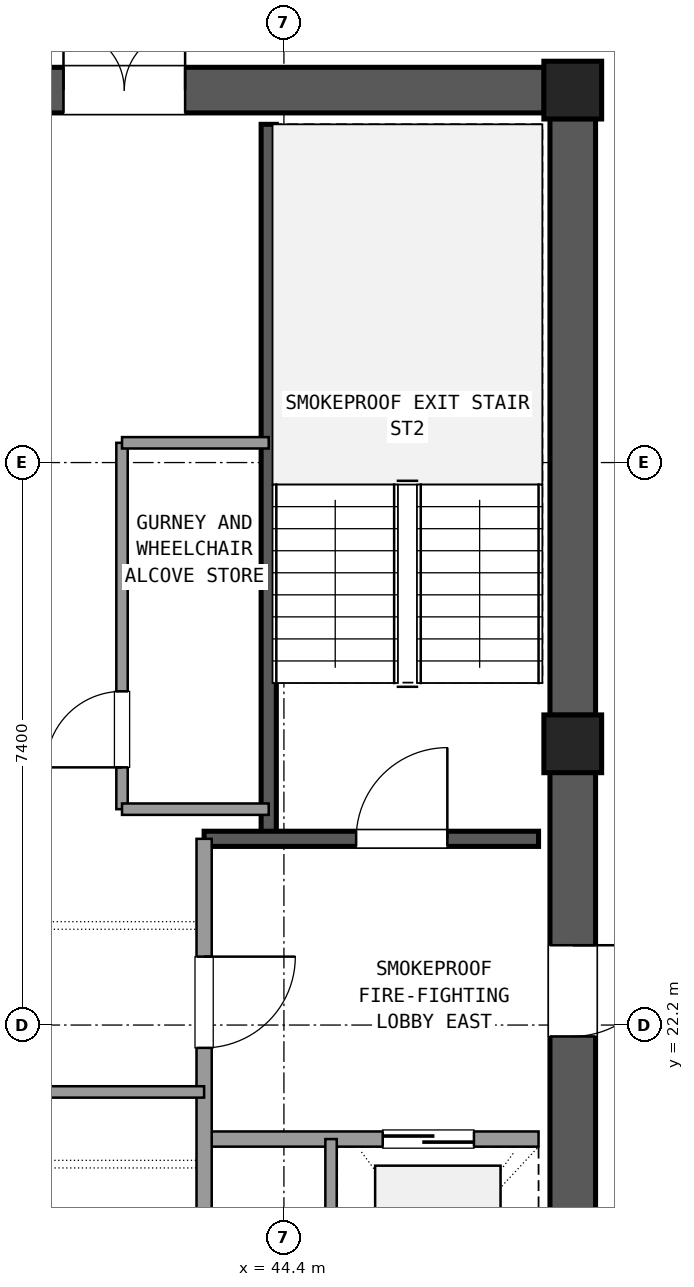
"""IFC4 building model, lengths in metres.
Left out: names, types, materials, properties, quantities, classifications, styles, units other than length and angle.
Written with IfcOpenShell. Run it as: python <this file> out.ifc"""

import sys

from ifc_helpers import new_model, si_unit, direction, frame, frame_2d, origin, origin_2d, place, context, subcontext, project, spatial, rectangle, extrude, element, fill, save


model = new_model("IFC4")
c1 = context("Model", 3, precision=1e-05, world=origin(), true_north=direction((0.0, 1.0)))
c2 = subcontext(c1, "Body", "Model", "MODEL_VIEW")
j1 = project(units=[si_unit("LENGTHUNIT", "METRE"), si_unit("PLANEANGLEUNIT", "RADIAN")], contexts=[c1])
p1 = place(None, origin())
s1 = spatial("IfcSite", under=j1, at=p1, CompositionType="ELEMENT")
p2 = place(p1, origin())
s2 = spatial("IfcBuilding", under=s1, at=p2, CompositionType="ELEMENT")
p3 = place(p2, frame((0.0, 0.0, 271.62)))
s3 = spatial("IfcBuildingStorey", under=s2, at=p3, CompositionType="ELEMENT", Elevation=271.62)
for number, where, z_axis, x_axis in (
    (1, (48.2, 25.9, 0.0), (0.0, 0.0, 1.0), (1.0, 0.0, 0.0)),
    (2, (48.2, 34.5, 0.0), (0.0, 0.0, 1.0), (1.0, 0.0, 0.0)),
):
    element("IfcColumn", number, at=place(p3, frame(where, z_axis=z_axis, x_axis=x_axis)), inside=s3, PredefinedType="COLUMN", context=c2, shape_type="SweptSolid", body=[
        extrude(rectangle(XDim=0.76, YDim=0.76, at=origin_2d()), origin(), (0.0, 0.0, 1.0), 3.6),
    ])
p4 = place(p3, frame((48.2, 17.675, 0.0), z_axis=(0.0, 0.0, 1.0), x_axis=(0.0, 1.0, 0.0)))
e3 = element("IfcWall", 3, at=p4, inside=s3, PredefinedType="SHEAR", context=c2, shape_type="SweptSolid", body=[
    extrude(rectangle(XDim=7.85, YDim=0.6, at=frame_2d((3.925, 0.0))), origin(), (0.0, 0.0, 1.0), 3.32),
])
p5 = place(p4, frame((4.375, 0.0, 0.0)))
e4 = element("IfcOpeningElement", 4, at=p5, cuts=e3, PredefinedType="OPENING", context=c2, shape_type="SweptSolid", body=[
    extrude(rectangle(XDim=1.2, YDim=2.15, at=frame_2d((0.6, 1.075))), frame((0.0, 0.31, 0.0), z_axis=(0.0, -1.0, 0.0), x_axis=(1.0, 0.0, 0.0)), (0.0, 0.0, 1.0), 0.62),
])
p6 = place(p3, frame((48.2, 26.275, 0.0), z_axis=(0.0, 0.0, 1.0), x_axis=(0.0, 1.0, 0.0)))
e5 = element("IfcWall", 5, at=p6, inside=s3, PredefinedType="SHEAR", context=c2, shape_type="SweptSolid", body=[
    extrude(rectangle(XDim=7.85, YDim=0.6, at=frame_2d((3.925, 0.0))), origin(), (0.0, 0.0, 1.0), 3.32),
])
p7 = place(p3, frame((47.825, 34.5, 0.0), z_axis=(0.0, 0.0, 1.0), x_axis=(-1.0, 0.0, 0.0)))
e6 = element("IfcWall", 6, at=p7, inside=s3, PredefinedType="SHEAR", context=c2, shape_type="SweptSolid", body=[
    extrude(rectangle(XDim=10.45, YDim=0.6, at=frame_2d((5.225, 0.0))), origin(), (0.0, 0.0, 1.0), 3.32),
])
p8 = place(p7, frame((4.725, 0.0, 0.0)))
e7 = element("IfcOpeningElement", 7, at=p8, cuts=e6, PredefinedType="OPENING", context=c2, shape_type="SweptSolid", body=[
    extrude(rectangle(XDim=1.6, YDim=2.2, at=frame_2d((0.8, 1.1))), frame((0.0, 0.31, 0.0), z_axis=(0.0, -1.0, 0.0), x_axis=(1.0, 0.0, 0.0)), (0.0, 0.0, 1.0), 0.62),
])
p9 = place(p3, frame((44.2, 24.65, 0.0), z_axis=(0.0, 0.0, 1.0), x_axis=(0.0, 1.0, 0.0)))
e8 = element("IfcWall", 8, at=p9, inside=s3, PredefinedType="SHEAR", context=c2, shape_type="SweptSolid", body=[
    extrude(rectangle(XDim=9.4, YDim=0.2, at=frame_2d((4.7, 0.0))), origin(), (0.0, 0.0, 1.0), 3.32),
])
p10 = place(p3, frame((43.35, 24.65, 0.0), z_axis=(0.0, 0.0, 1.0), x_axis=(1.0, 0.0, 0.0)))
e9 = element("IfcWall", 9, at=p10, inside=s3, PredefinedType="SHEAR", context=c2, shape_type="SweptSolid", body=[
    extrude(rectangle(XDim=4.4, YDim=0.2, at=frame_2d((2.2, 0.0))), origin(), (0.0, 0.0, 1.0), 3.32),
])
p11 = place(p10, frame((2.0, 0.0, 0.0)))
e10 = element("IfcOpeningElement", 10, at=p11, cuts=e9, PredefinedType="OPENING", context=c2, shape_type="SweptSolid", body=[
    extrude(rectangle(XDim=1.2, YDim=2.15, at=frame_2d((0.6, 1.075))), frame((0.0, 0.11, 0.0), z_axis=(0.0, -1.0, 0.0), x_axis=(1.0, 0.0, 0.0)), (0.0, 0.0, 1.0), 0.22),
])
p12 = place(p3, frame((43.35, 20.7, 0.0), z_axis=(0.0, 0.0, 1.0), x_axis=(1.0, 0.0, 0.0)))
e11 = element("IfcWall", 11, at=p12, inside=s3, PredefinedType="SOLIDWALL", context=c2, shape_type="SweptSolid", body=[
    extrude(rectangle(XDim=4.4, YDim=0.2, at=frame_2d((2.2, 0.0))), origin(), (0.0, 0.0, 1.0), 2.61),
])
p13 = place(p12, frame((2.35, 0.0, 0.0)))
e12 = element("IfcOpeningElement", 12, at=p13, cuts=e11, PredefinedType="OPENING", context=c2, shape_type="SweptSolid", body=[
    extrude(rectangle(XDim=1.2, YDim=2.15, at=frame_2d((0.6, 1.075))), frame((0.0, 0.11, 0.0), z_axis=(0.0, -1.0, 0.0), x_axis=(1.0, 0.0, 0.0)), (0.0, 0.0, 1.0), 0.22),
])
p14 = place(p3, frame((43.35, 17.75, 0.0), z_axis=(0.0, 0.0, 1.0), x_axis=(0.0, 1.0, 0.0)))
e13 = element("IfcWall", 13, at=p14, inside=s3, PredefinedType="SOLIDWALL", context=c2, shape_type="SweptSolid", body=[
    extrude(rectangle(XDim=6.9, YDim=0.2, at=frame_2d((3.45, 0.0))), origin(), (0.0, 0.0, 1.0), 2.61),
])
p15 = place(p14, frame((4.15, 0.0, 0.0)))
e14 = element("IfcOpeningElement", 14, at=p15, cuts=e13, PredefinedType="OPENING", context=c2, shape_type="SweptSolid", body=[
    extrude(rectangle(XDim=1.2, YDim=2.15, at=frame_2d((0.6, 1.075))), frame((0.0, 0.11, 0.0), z_axis=(0.0, -1.0, 0.0), x_axis=(1.0, 0.0, 0.0)), (0.0, 0.0, 1.0), 0.22),
])
p16 = place(p3, frame((45.02, 17.75, 0.0), z_axis=(0.0, 0.0, 1.0), x_axis=(0.0, 1.0, 0.0)))
e15 = element("IfcWall", 15, at=p16, inside=s3, PredefinedType="PARTITIONING", context=c2, shape_type="SweptSolid", body=[
    extrude(rectangle(XDim=2.95, YDim=0.15, at=frame_2d((1.475, 0.0))), origin(), (0.0, 0.0, 1.0), 2.61),
])
p17 = place(p3, frame((37.25, 21.32, 0.0), z_axis=(0.0, 0.0, 1.0), x_axis=(1.0, 0.0, 0.0)))
e16 = element("IfcWall", 16, at=p17, inside=s3, PredefinedType="PARTITIONING", context=c2, shape_type="SweptSolid", body=[
    extrude(rectangle(XDim=6.1, YDim=0.15, at=frame_2d((3.05, 0.0))), origin(), (0.0, 0.0, 1.0), 2.61),
])
p18 = place(p17, frame((0.55, 0.0, 0.0)))
e17 = element("IfcOpeningElement", 17, at=p18, cuts=e16, PredefinedType="OPENING", context=c2, shape_type="SweptSolid", body=[
    extrude(rectangle(XDim=1.0, YDim=2.15, at=frame_2d((0.5, 1.075))), frame((0.0, 0.085, 0.0), z_axis=(0.0, -1.0, 0.0), x_axis=(1.0, 0.0, 0.0)), (0.0, 0.0, 1.0), 0.17),
])
p19 = place(p17, frame((2.5, 0.0, 0.0)))
e18 = element("IfcOpeningElement", 18, at=p19, cuts=e16, PredefinedType="OPENING", context=c2, shape_type="SweptSolid", body=[
    extrude(rectangle(XDim=1.0, YDim=2.15, at=frame_2d((0.5, 1.075))), frame((0.0, 0.085, 0.0), z_axis=(0.0, -1.0, 0.0), x_axis=(1.0, 0.0, 0.0)), (0.0, 0.0, 1.0), 0.17),
])
p20 = place(p3, frame((42.27, 25.04, 0.0), z_axis=(0.0, 0.0, 1.0), x_axis=(0.0, 1.0, 0.0)))
e19 = element("IfcWall", 19, at=p20, inside=s3, PredefinedType="PARTITIONING", context=c2, shape_type="SweptSolid", body=[
    extrude(rectangle(XDim=4.82, YDim=0.15, at=frame_2d((2.41, 0.0))), origin(), (0.0, 0.0, 1.0), 2.61),
])
p21 = place(p20, frame((0.55, 0.0, 0.0)))
e20 = element("IfcOpeningElement", 20, at=p21, cuts=e19, PredefinedType="OPENING", context=c2, shape_type="SweptSolid", body=[
    extrude(rectangle(XDim=1.0, YDim=2.15, at=frame_2d((0.5, 1.075))), frame((0.0, 0.085, 0.0), z_axis=(0.0, -1.0, 0.0), x_axis=(1.0, 0.0, 0.0)), (0.0, 0.0, 1.0), 0.17),
])
for number, where, z_axis, x_axis in (
    (21, (42.27, 25.04, 0.0), (0.0, 0.0, 1.0), (1.0, 0.0, 0.0)),
    (22, (42.27, 29.86, 0.0), (0.0, 0.0, 1.0), (1.0, 0.0, 0.0)),
):
    element("IfcWall", number, at=place(p3, frame(where, z_axis=z_axis, x_axis=x_axis)), inside=s3, PredefinedType="PARTITIONING", context=c2, shape_type="SweptSolid", body=[
        extrude(rectangle(XDim=1.93, YDim=0.15, at=frame_2d((0.965, 0.0))), origin(), (0.0, 0.0, 1.0), 2.61),
    ])
p22 = place(p11, origin())
e23 = element("IfcDoor", 23, at=p22, inside=s3, OperationType="SINGLE_SWING_RIGHT", PredefinedType="DOOR", context=c2, shape_type="SweptSolid", body=[
    extrude(rectangle(XDim=1.2, YDim=2.15, at=frame_2d((0.6, 1.075))), frame((0.0, 0.025, 0.0), z_axis=(0.0, -1.0, 0.0), x_axis=(1.0, 0.0, 0.0)), (0.0, 0.0, 1.0), 0.05),
])
fill(e10, e23)
p23 = place(p13, origin())
e24 = element("IfcDoor", 24, at=p23, inside=s3, OperationType="SLIDING_TO_RIGHT", PredefinedType="DOOR", context=c2, shape_type="SweptSolid", body=[
    extrude(rectangle(XDim=1.2, YDim=2.15, at=frame_2d((0.6, 1.075))), frame((0.0, 0.025, 0.0), z_axis=(0.0, -1.0, 0.0), x_axis=(1.0, 0.0, 0.0)), (0.0, 0.0, 1.0), 0.05),
])
fill(e12, e24)
p24 = place(p15, frame((1.2, 0.0, 0.0), z_axis=(0.0, 0.0, 1.0), x_axis=(-1.0, 0.0, 0.0)))
e25 = element("IfcDoor", 25, at=p24, inside=s3, OperationType="SINGLE_SWING_RIGHT", PredefinedType="DOOR", context=c2, shape_type="SweptSolid", body=[
    extrude(rectangle(XDim=1.2, YDim=2.15, at=frame_2d((0.6, 1.075))), frame((0.0, 0.025, 0.0), z_axis=(0.0, -1.0, 0.0), x_axis=(1.0, 0.0, 0.0)), (0.0, 0.0, 1.0), 0.05),
])
fill(e14, e25)
p25 = place(p5, frame((1.2, 0.0, 0.0), z_axis=(0.0, 0.0, 1.0), x_axis=(-1.0, 0.0, 0.0)))
e26 = element("IfcDoor", 26, at=p25, inside=s3, OperationType="SINGLE_SWING_RIGHT", PredefinedType="DOOR", context=c2, shape_type="SweptSolid", body=[
    extrude(rectangle(XDim=1.2, YDim=2.15, at=frame_2d((0.6, 1.075))), frame((0.0, 0.025, 0.0), z_axis=(0.0, -1.0, 0.0), x_axis=(1.0, 0.0, 0.0)), (0.0, 0.0, 1.0), 0.05),
])
fill(e4, e26)
p26 = place(p8, frame((1.6, 0.0, 0.0), z_axis=(0.0, 0.0, 1.0), x_axis=(-1.0, 0.0, 0.0)))
e27 = element("IfcDoor", 27, at=p26, inside=s3, OperationType="DOUBLE_DOOR_SINGLE_SWING", PredefinedType="DOOR", context=c2, shape_type="SweptSolid", body=[
    extrude(rectangle(XDim=1.6, YDim=2.2, at=frame_2d((0.8, 1.1))), frame((0.0, 0.025, 0.0), z_axis=(0.0, -1.0, 0.0), x_axis=(1.0, 0.0, 0.0)), (0.0, 0.0, 1.0), 0.05),
])
fill(e7, e27)
p27 = place(p21, origin())
e28 = element("IfcDoor", 28, at=p27, inside=s3, OperationType="SINGLE_SWING_LEFT", PredefinedType="DOOR", context=c2, shape_type="SweptSolid", body=[
    extrude(rectangle(XDim=1.0, YDim=2.15, at=frame_2d((0.5, 1.075))), frame((0.0, 0.025, 0.0), z_axis=(0.0, -1.0, 0.0), x_axis=(1.0, 0.0, 0.0)), (0.0, 0.0, 1.0), 0.05),
])
fill(e20, e28)
save(model, sys.argv[1])
